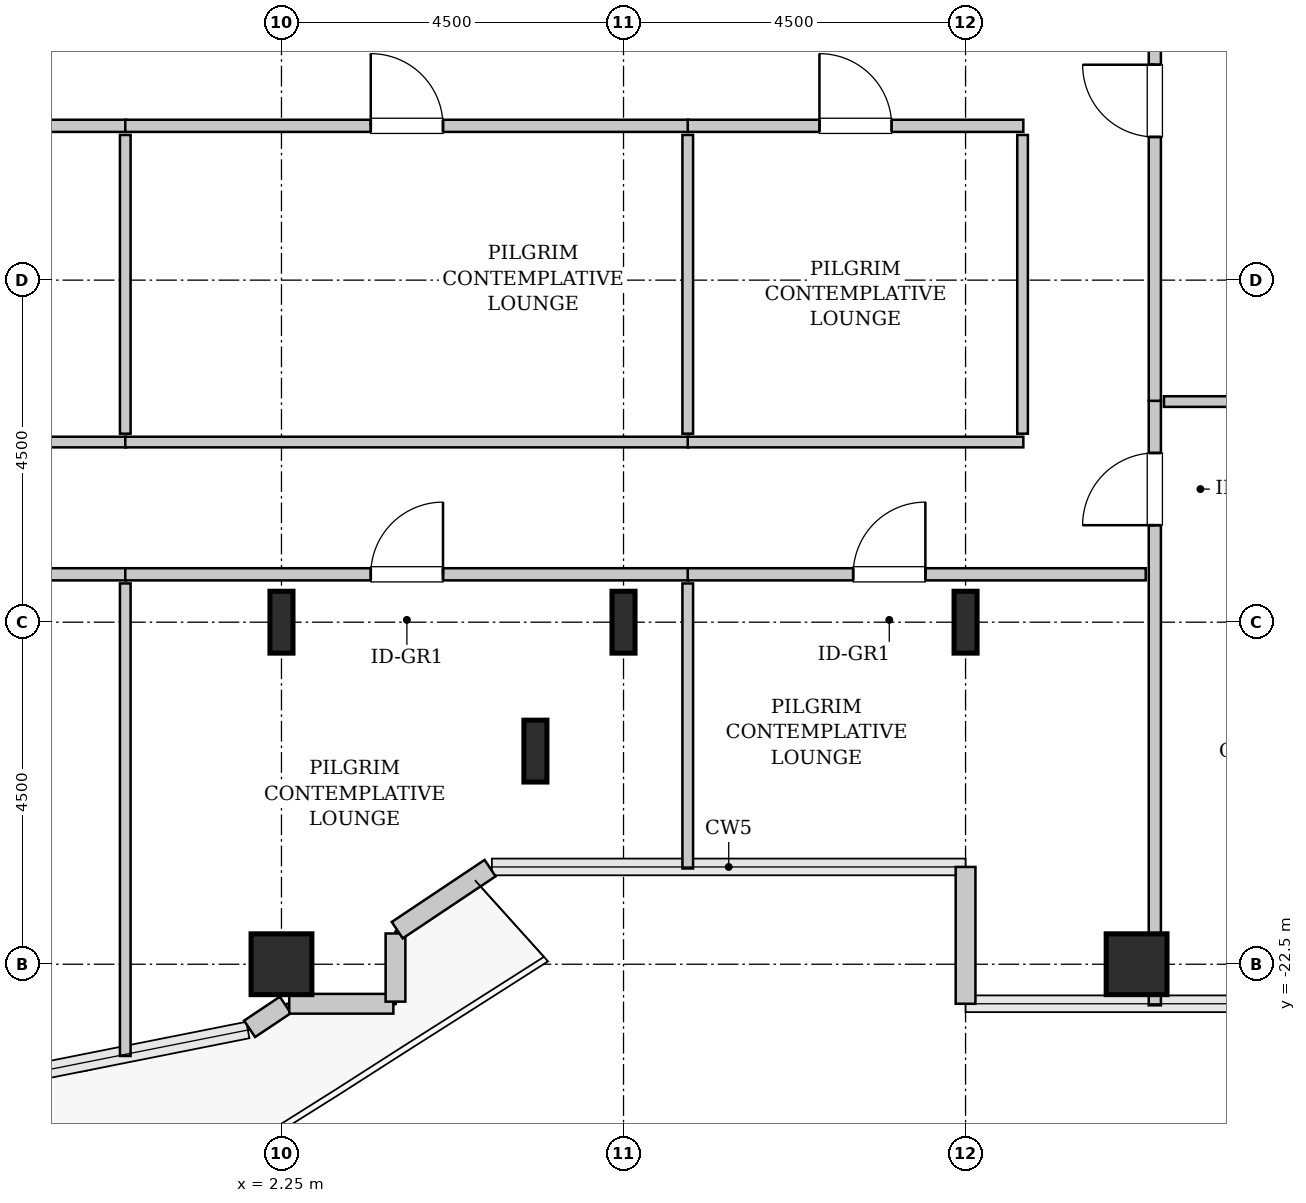
"""IFC4 building model, lengths in metres.
Left out: names, types, materials, properties, quantities, classifications, styles, units other than length and angle.
Written with IfcOpenShell. Run it as: python <this file> out.ifc"""

import sys

from ifc_helpers import new_model, si_unit, direction, frame, frame_2d, origin, origin_2d, place, context, subcontext, project, spatial, rectangle, hollow_rectangle, i_section, extrude, source, transform, mapped, element, fill, save


model = new_model("IFC4")
c1 = context("Model", 3, precision=1e-05, world=origin(), true_north=direction((0.0, 1.0)))
c2 = subcontext(c1, "Body", "Model", "MODEL_VIEW")
j1 = project(units=[si_unit("LENGTHUNIT", "METRE"), si_unit("PLANEANGLEUNIT", "RADIAN")], contexts=[c1])
p1 = place(None, origin())
s1 = spatial("IfcSite", under=j1, at=p1, CompositionType="ELEMENT")
p2 = place(p1, origin())
s2 = spatial("IfcBuilding", under=s1, at=p2, CompositionType="ELEMENT")
p3 = place(p2, frame((0.0, 0.0, 164.0)))
s3 = spatial("IfcBuildingStorey", under=s2, at=p3, CompositionType="ELEMENT", Elevation=164.0)
m1 = source(origin(), c2, "Body", "SweptSolid", [
    extrude(hollow_rectangle(XDim=0.8, YDim=0.8, WallThickness=0.04, InnerFilletRadius=0.04, OuterFilletRadius=0.08, at=origin_2d()), origin(), (0.0, 0.0, 1.0), 3.8),
])
p4 = place(p3, frame((2.25, -22.5, 0.0), z_axis=(0.0, 0.0, 1.0), x_axis=(1.0, 0.0, 0.0)))
e1 = element("IfcColumn", 1, at=p4, inside=s3, PredefinedType="COLUMN", context=c2, shape_type="MappedRepresentation", body=[
    mapped(m1, transform((0.0, 0.0, 0.0), x_axis=(1.0, 0.0, 0.0), y_axis=(0.0, 1.0, 0.0), z_axis=(0.0, 0.0, 1.0), scale=1.0)),
])
m2 = source(origin(), c2, "Body", "SweptSolid", [
    extrude(i_section(OverallWidth=0.303, OverallDepth=0.814, WebThickness=0.021, FlangeThickness=0.04, FilletRadius=0.03, at=origin_2d()), origin(), (0.0, 0.0, 1.0), 3.8),
])
for number, where, z_axis, x_axis in (
    (2, (2.25, -18.0, 0.0), (0.0, 0.0, 1.0), (1.0, 0.0, 0.0)),
    (3, (5.591, -19.696, 0.0), (0.0, 0.0, 1.0), (1.0, 0.0, 0.0)),
    (4, (6.75, -18.0, 0.0), (0.0, 0.0, 1.0), (1.0, 0.0, 0.0)),
    (5, (11.25, -18.0, 0.0), (0.0, 0.0, 1.0), (1.0, 0.0, 0.0)),
):
    element("IfcColumn", number, at=place(p3, frame(where, z_axis=z_axis, x_axis=x_axis)), inside=s3, PredefinedType="COLUMN", context=c2, shape_type="MappedRepresentation", body=[
        mapped(m2, transform((0.0, 0.0, 0.0), x_axis=(1.0, 0.0, 0.0), y_axis=(0.0, 1.0, 0.0), z_axis=(0.0, 0.0, 1.0), scale=1.0)),
    ])
p5 = place(p3, frame((13.5, -22.5, 0.0), z_axis=(0.0, 0.0, 1.0), x_axis=(1.0, 0.0, 0.0)))
e6 = element("IfcColumn", 6, at=p5, inside=s3, PredefinedType="COLUMN", context=c2, shape_type="MappedRepresentation", body=[
    mapped(m1, transform((0.0, 0.0, 0.0), x_axis=(1.0, 0.0, 0.0), y_axis=(0.0, 1.0, 0.0), z_axis=(0.0, 0.0, 1.0), scale=1.0)),
])
m3 = source(origin(), c2, "Body", "SweptSolid", [
    extrude(rectangle(XDim=1.8, YDim=0.26, at=frame_2d((0.9, 0.0))), origin(), (0.0, 0.0, 1.0), 3.55),
])
p6 = place(p3, frame((11.25, -21.22, 0.0), z_axis=(0.0, 0.0, 1.0), x_axis=(0.0, -1.0, 0.0)))
e7 = element("IfcWall", 7, at=p6, inside=s3, PredefinedType="SOLIDWALL", context=c2, shape_type="MappedRepresentation", body=[
    mapped(m3, transform((0.0, 0.0, 0.0), x_axis=(1.0, 0.0, 0.0), y_axis=(0.0, 1.0, 0.0), z_axis=(0.0, 0.0, 1.0), scale=1.0)),
])
m4 = source(origin(), c2, "Body", "SweptSolid", [
    extrude(rectangle(XDim=0.565, YDim=0.26, at=frame_2d((0.283, 0.0))), origin(), (0.0, 0.0, 1.0), 3.55),
])
p7 = place(p3, frame((1.831, -23.35, 0.0), z_axis=(0.0, 0.0, 1.0), x_axis=(0.831651492666, 0.555297933317, 0.0)))
e8 = element("IfcWall", 8, at=p7, inside=s3, PredefinedType="SOLIDWALL", context=c2, shape_type="MappedRepresentation", body=[
    mapped(m4, transform((0.0, 0.0, 0.0), x_axis=(1.0, 0.0, 0.0), y_axis=(0.0, 1.0, 0.0), z_axis=(0.0, 0.0, 1.0), scale=1.0)),
])
m5 = source(origin(), c2, "Body", "SweptSolid", [
    extrude(rectangle(XDim=1.37, YDim=0.26, at=frame_2d((0.685, 0.0))), origin(), (0.0, 0.0, 1.0), 3.55),
])
p8 = place(p3, frame((2.352, -23.02, 0.0), z_axis=(0.0, 0.0, 1.0), x_axis=(1.0, 0.0, 0.0)))
e9 = element("IfcWall", 9, at=p8, inside=s3, PredefinedType="SOLIDWALL", context=c2, shape_type="MappedRepresentation", body=[
    mapped(m5, transform((0.0, 0.0, 0.0), x_axis=(1.0, 0.0, 0.0), y_axis=(0.0, 1.0, 0.0), z_axis=(0.0, 0.0, 1.0), scale=1.0)),
])
m6 = source(origin(), c2, "Body", "SweptSolid", [
    extrude(rectangle(XDim=0.897, YDim=0.26, at=frame_2d((0.448, 0.0))), origin(), (0.0, 0.0, 1.0), 3.55),
])
p9 = place(p3, frame((3.75, -22.992, 0.0), z_axis=(0.0, 0.0, 1.0), x_axis=(0.0, 1.0, 0.0)))
e10 = element("IfcWall", 10, at=p9, inside=s3, PredefinedType="SOLIDWALL", context=c2, shape_type="MappedRepresentation", body=[
    mapped(m6, transform((0.0, 0.0, 0.0), x_axis=(1.0, 0.0, 0.0), y_axis=(0.0, 1.0, 0.0), z_axis=(0.0, 0.0, 1.0), scale=1.0)),
])
m7 = source(origin(), c2, "Body", "SweptSolid", [
    extrude(rectangle(XDim=1.469, YDim=0.26, at=frame_2d((0.734, 0.0))), origin(), (0.0, 0.0, 1.0), 3.55),
])
p10 = place(p3, frame((3.773, -22.052, 0.0), z_axis=(0.0, 0.0, 1.0), x_axis=(0.831461760506, 0.555581983884, 0.0)))
e11 = element("IfcWall", 11, at=p10, inside=s3, PredefinedType="SOLIDWALL", context=c2, shape_type="MappedRepresentation", body=[
    mapped(m7, transform((0.0, 0.0, 0.0), x_axis=(1.0, 0.0, 0.0), y_axis=(0.0, 1.0, 0.0), z_axis=(0.0, 0.0, 1.0), scale=1.0)),
])
m8 = source(origin(), c2, "Body", "SweptSolid", [
    extrude(rectangle(XDim=7.953, YDim=0.16, at=frame_2d((3.976, 0.0))), origin(), (0.0, 0.0, 1.0), 3.535),
])
p11 = place(p3, frame((13.74, -23.04, 0.0), z_axis=(0.0, 0.0, 1.0), x_axis=(0.0, 1.0, 0.0)))
e12 = element("IfcWall", 12, at=p11, inside=s3, PredefinedType="PARTITIONING", context=c2, shape_type="MappedRepresentation", body=[
    mapped(m8, transform((0.0, 0.0, 0.0), x_axis=(1.0, 0.0, 0.0), y_axis=(0.0, 1.0, 0.0), z_axis=(0.0, 0.0, 1.0), scale=1.0)),
])
p12 = place(p11, frame((6.316, 0.0, 0.0)))
e13 = element("IfcOpeningElement", 13, at=p12, cuts=e12, PredefinedType="OPENING", context=c2, shape_type="SweptSolid", body=[
    extrude(rectangle(XDim=0.95, YDim=2.1, at=frame_2d((0.475, 1.05))), frame((0.0, 0.09, 0.0), z_axis=(0.0, -1.0, 0.0), x_axis=(1.0, 0.0, 0.0)), (0.0, 0.0, 1.0), 0.18),
])
m9 = source(origin(), c2, "Body", "SweptSolid", [
    extrude(rectangle(XDim=11.43, YDim=0.14, at=frame_2d((5.715, 0.0))), origin(), (0.0, 0.0, 1.0), 3.535),
])
p13 = place(p3, frame((13.86, -15.097, 0.0), z_axis=(0.0, 0.0, 1.0), x_axis=(1.0, 0.0, 0.0)))
e14 = element("IfcWall", 14, at=p13, inside=s3, PredefinedType="PARTITIONING", context=c2, shape_type="MappedRepresentation", body=[
    mapped(m9, transform((0.0, 0.0, 0.0), x_axis=(1.0, 0.0, 0.0), y_axis=(0.0, 1.0, 0.0), z_axis=(0.0, 0.0, 1.0), scale=1.0)),
])
m10 = source(origin(), c2, "Body", "SweptSolid", [
    extrude(rectangle(XDim=7.892, YDim=0.16, at=frame_2d((3.946, 0.0))), origin(), (0.0, 0.0, 1.0), 3.535),
])
p14 = place(p3, frame((13.74, -15.087, 0.0), z_axis=(0.0, 0.0, 1.0), x_axis=(0.0, 1.0, 0.0)))
e15 = element("IfcWall", 15, at=p14, inside=s3, PredefinedType="PARTITIONING", context=c2, shape_type="MappedRepresentation", body=[
    mapped(m10, transform((0.0, 0.0, 0.0), x_axis=(1.0, 0.0, 0.0), y_axis=(0.0, 1.0, 0.0), z_axis=(0.0, 0.0, 1.0), scale=1.0)),
])
p15 = place(p14, frame((3.471, 0.0, 0.0)))
e16 = element("IfcOpeningElement", 16, at=p15, cuts=e15, PredefinedType="OPENING", context=c2, shape_type="SweptSolid", body=[
    extrude(rectangle(XDim=0.95, YDim=2.1, at=frame_2d((0.475, 1.05))), frame((0.0, 0.09, 0.0), z_axis=(0.0, -1.0, 0.0), x_axis=(1.0, 0.0, 0.0)), (0.0, 0.0, 1.0), 0.18),
])
m11 = source(origin(), c2, "Body", "SweptSolid", [
    extrude(rectangle(XDim=8.81, YDim=0.16, at=frame_2d((4.405, 0.0))), origin(), (0.0, 0.0, 1.0), 3.535),
])
p16 = place(p3, frame((-8.605, -17.37, 0.0), z_axis=(0.0, 0.0, 1.0), x_axis=(1.0, 0.0, 0.0)))
e17 = element("IfcWall", 17, at=p16, inside=s3, PredefinedType="PARTITIONING", context=c2, shape_type="MappedRepresentation", body=[
    mapped(m11, transform((0.0, 0.0, 0.0), x_axis=(1.0, 0.0, 0.0), y_axis=(0.0, 1.0, 0.0), z_axis=(0.0, 0.0, 1.0), scale=1.0)),
])
p17 = place(p16, frame((3.93, 0.0, 0.0)))
e18 = element("IfcOpeningElement", 18, at=p17, cuts=e17, PredefinedType="OPENING", context=c2, shape_type="SweptSolid", body=[
    extrude(rectangle(XDim=0.95, YDim=2.1, at=frame_2d((0.475, 1.05))), frame((0.0, 0.09, 0.0), z_axis=(0.0, -1.0, 0.0), x_axis=(1.0, 0.0, 0.0)), (0.0, 0.0, 1.0), 0.18),
])
m12 = source(origin(), c2, "Body", "SweptSolid", [
    extrude(rectangle(XDim=6.216, YDim=0.14, at=frame_2d((3.108, 0.0))), origin(), (0.0, 0.0, 1.0), 3.535),
])
p18 = place(p3, frame((0.195, -23.706, 0.0), z_axis=(0.0, 0.0, 1.0), x_axis=(0.0, 1.0, 0.0)))
e19 = element("IfcWall", 19, at=p18, inside=s3, PredefinedType="PARTITIONING", context=c2, shape_type="MappedRepresentation", body=[
    mapped(m12, transform((0.0, 0.0, 0.0), x_axis=(1.0, 0.0, 0.0), y_axis=(0.0, 1.0, 0.0), z_axis=(0.0, 0.0, 1.0), scale=1.0)),
])
m13 = source(origin(), c2, "Body", "SweptSolid", [
    extrude(rectangle(XDim=8.7, YDim=0.16, at=frame_2d((4.35, 0.0))), origin(), (0.0, 0.0, 1.0), 3.535),
])
p19 = place(p3, frame((-8.495, -11.47, 0.0), z_axis=(0.0, 0.0, 1.0), x_axis=(1.0, 0.0, 0.0)))
e20 = element("IfcWall", 20, at=p19, inside=s3, PredefinedType="PARTITIONING", context=c2, shape_type="MappedRepresentation", body=[
    mapped(m13, transform((0.0, 0.0, 0.0), x_axis=(1.0, 0.0, 0.0), y_axis=(0.0, 1.0, 0.0), z_axis=(0.0, 0.0, 1.0), scale=1.0)),
])
p20 = place(p19, frame((3.875, 0.0, 0.0)))
e21 = element("IfcOpeningElement", 21, at=p20, cuts=e20, PredefinedType="OPENING", context=c2, shape_type="SweptSolid", body=[
    extrude(rectangle(XDim=0.95, YDim=2.1, at=frame_2d((0.475, 1.05))), frame((0.0, 0.09, 0.0), z_axis=(0.0, -1.0, 0.0), x_axis=(1.0, 0.0, 0.0)), (0.0, 0.0, 1.0), 0.18),
])
m14 = source(origin(), c2, "Body", "SweptSolid", [
    extrude(rectangle(XDim=8.7, YDim=0.14, at=frame_2d((4.35, 0.0))), origin(), (0.0, 0.0, 1.0), 3.535),
])
p21 = place(p3, frame((-8.495, -15.63, 0.0), z_axis=(0.0, 0.0, 1.0), x_axis=(1.0, 0.0, 0.0)))
e22 = element("IfcWall", 22, at=p21, inside=s3, PredefinedType="PARTITIONING", context=c2, shape_type="MappedRepresentation", body=[
    mapped(m14, transform((0.0, 0.0, 0.0), x_axis=(1.0, 0.0, 0.0), y_axis=(0.0, 1.0, 0.0), z_axis=(0.0, 0.0, 1.0), scale=1.0)),
])
m15 = source(origin(), c2, "Body", "SweptSolid", [
    extrude(rectangle(XDim=3.93, YDim=0.14, at=frame_2d((1.965, 0.0))), origin(), (0.0, 0.0, 1.0), 3.535),
])
p22 = place(p3, frame((0.195, -15.52, 0.0), z_axis=(0.0, 0.0, 1.0), x_axis=(0.0, 1.0, 0.0)))
e23 = element("IfcWall", 23, at=p22, inside=s3, PredefinedType="PARTITIONING", context=c2, shape_type="MappedRepresentation", body=[
    mapped(m15, transform((0.0, 0.0, 0.0), x_axis=(1.0, 0.0, 0.0), y_axis=(0.0, 1.0, 0.0), z_axis=(0.0, 0.0, 1.0), scale=1.0)),
])
m16 = source(origin(), c2, "Body", "SweptSolid", [
    extrude(rectangle(XDim=7.41, YDim=0.16, at=frame_2d((3.705, 0.0))), origin(), (0.0, 0.0, 1.0), 3.535),
])
p23 = place(p3, frame((0.195, -17.37, 0.0), z_axis=(0.0, 0.0, 1.0), x_axis=(1.0, 0.0, 0.0)))
e24 = element("IfcWall", 24, at=p23, inside=s3, PredefinedType="PARTITIONING", context=c2, shape_type="MappedRepresentation", body=[
    mapped(m16, transform((0.0, 0.0, 0.0), x_axis=(1.0, 0.0, 0.0), y_axis=(0.0, 1.0, 0.0), z_axis=(0.0, 0.0, 1.0), scale=1.0)),
])
p24 = place(p23, frame((3.23, 0.0, 0.0)))
e25 = element("IfcOpeningElement", 25, at=p24, cuts=e24, PredefinedType="OPENING", context=c2, shape_type="SweptSolid", body=[
    extrude(rectangle(XDim=0.95, YDim=2.1, at=frame_2d((0.475, 1.05))), frame((0.0, 0.09, 0.0), z_axis=(0.0, -1.0, 0.0), x_axis=(1.0, 0.0, 0.0)), (0.0, 0.0, 1.0), 0.18),
])
m17 = source(origin(), c2, "Body", "SweptSolid", [
    extrude(rectangle(XDim=3.75, YDim=0.14, at=frame_2d((1.875, 0.0))), origin(), (0.0, 0.0, 1.0), 3.535),
])
p25 = place(p3, frame((7.595, -21.24, 0.0), z_axis=(0.0, 0.0, 1.0), x_axis=(0.0, 1.0, 0.0)))
e26 = element("IfcWall", 26, at=p25, inside=s3, PredefinedType="PARTITIONING", context=c2, shape_type="MappedRepresentation", body=[
    mapped(m17, transform((0.0, 0.0, 0.0), x_axis=(1.0, 0.0, 0.0), y_axis=(0.0, 1.0, 0.0), z_axis=(0.0, 0.0, 1.0), scale=1.0)),
])
p26 = place(p3, frame((0.195, -11.47, 0.0), z_axis=(0.0, 0.0, 1.0), x_axis=(1.0, 0.0, 0.0)))
e27 = element("IfcWall", 27, at=p26, inside=s3, PredefinedType="PARTITIONING", context=c2, shape_type="MappedRepresentation", body=[
    mapped(m16, transform((0.0, 0.0, 0.0), x_axis=(1.0, 0.0, 0.0), y_axis=(0.0, 1.0, 0.0), z_axis=(0.0, 0.0, 1.0), scale=1.0)),
])
p27 = place(p26, frame((3.23, 0.0, 0.0)))
e28 = element("IfcOpeningElement", 28, at=p27, cuts=e27, PredefinedType="OPENING", context=c2, shape_type="SweptSolid", body=[
    extrude(rectangle(XDim=0.95, YDim=2.1, at=frame_2d((0.475, 1.05))), frame((0.0, 0.09, 0.0), z_axis=(0.0, -1.0, 0.0), x_axis=(1.0, 0.0, 0.0)), (0.0, 0.0, 1.0), 0.18),
])
m18 = source(origin(), c2, "Body", "SweptSolid", [
    extrude(rectangle(XDim=7.41, YDim=0.14, at=frame_2d((3.705, 0.0))), origin(), (0.0, 0.0, 1.0), 3.535),
])
p28 = place(p3, frame((0.195, -15.63, 0.0), z_axis=(0.0, 0.0, 1.0), x_axis=(1.0, 0.0, 0.0)))
e29 = element("IfcWall", 29, at=p28, inside=s3, PredefinedType="PARTITIONING", context=c2, shape_type="MappedRepresentation", body=[
    mapped(m18, transform((0.0, 0.0, 0.0), x_axis=(1.0, 0.0, 0.0), y_axis=(0.0, 1.0, 0.0), z_axis=(0.0, 0.0, 1.0), scale=1.0)),
])
p29 = place(p3, frame((7.595, -15.52, 0.0), z_axis=(0.0, 0.0, 1.0), x_axis=(0.0, 1.0, 0.0)))
e30 = element("IfcWall", 30, at=p29, inside=s3, PredefinedType="PARTITIONING", context=c2, shape_type="MappedRepresentation", body=[
    mapped(m15, transform((0.0, 0.0, 0.0), x_axis=(1.0, 0.0, 0.0), y_axis=(0.0, 1.0, 0.0), z_axis=(0.0, 0.0, 1.0), scale=1.0)),
])
m19 = source(origin(), c2, "Body", "SweptSolid", [
    extrude(rectangle(XDim=6.025, YDim=0.16, at=frame_2d((3.013, 0.0))), origin(), (0.0, 0.0, 1.0), 3.535),
])
p30 = place(p3, frame((7.595, -17.37, 0.0), z_axis=(0.0, 0.0, 1.0), x_axis=(1.0, 0.0, 0.0)))
e31 = element("IfcWall", 31, at=p30, inside=s3, PredefinedType="PARTITIONING", context=c2, shape_type="MappedRepresentation", body=[
    mapped(m19, transform((0.0, 0.0, 0.0), x_axis=(1.0, 0.0, 0.0), y_axis=(0.0, 1.0, 0.0), z_axis=(0.0, 0.0, 1.0), scale=1.0)),
])
p31 = place(p30, frame((2.176, 0.0, 0.0)))
e32 = element("IfcOpeningElement", 32, at=p31, cuts=e31, PredefinedType="OPENING", context=c2, shape_type="SweptSolid", body=[
    extrude(rectangle(XDim=0.95, YDim=2.1, at=frame_2d((0.475, 1.05))), frame((0.0, 0.09, 0.0), z_axis=(0.0, -1.0, 0.0), x_axis=(1.0, 0.0, 0.0)), (0.0, 0.0, 1.0), 0.18),
])
m20 = source(origin(), c2, "Body", "SweptSolid", [
    extrude(rectangle(XDim=4.415, YDim=0.16, at=frame_2d((2.208, 0.0))), origin(), (0.0, 0.0, 1.0), 3.535),
])
p32 = place(p3, frame((7.595, -11.47, 0.0), z_axis=(0.0, 0.0, 1.0), x_axis=(1.0, 0.0, 0.0)))
e33 = element("IfcWall", 33, at=p32, inside=s3, PredefinedType="PARTITIONING", context=c2, shape_type="MappedRepresentation", body=[
    mapped(m20, transform((0.0, 0.0, 0.0), x_axis=(1.0, 0.0, 0.0), y_axis=(0.0, 1.0, 0.0), z_axis=(0.0, 0.0, 1.0), scale=1.0)),
])
p33 = place(p32, frame((1.732, 0.0, 0.0)))
e34 = element("IfcOpeningElement", 34, at=p33, cuts=e33, PredefinedType="OPENING", context=c2, shape_type="SweptSolid", body=[
    extrude(rectangle(XDim=0.95, YDim=2.1, at=frame_2d((0.475, 1.05))), frame((0.0, 0.09, 0.0), z_axis=(0.0, -1.0, 0.0), x_axis=(1.0, 0.0, 0.0)), (0.0, 0.0, 1.0), 0.18),
])
m21 = source(origin(), c2, "Body", "SweptSolid", [
    extrude(rectangle(XDim=4.415, YDim=0.14, at=frame_2d((2.208, 0.0))), origin(), (0.0, 0.0, 1.0), 3.535),
])
p34 = place(p3, frame((7.595, -15.63, 0.0), z_axis=(0.0, 0.0, 1.0), x_axis=(1.0, 0.0, 0.0)))
e35 = element("IfcWall", 35, at=p34, inside=s3, PredefinedType="PARTITIONING", context=c2, shape_type="MappedRepresentation", body=[
    mapped(m21, transform((0.0, 0.0, 0.0), x_axis=(1.0, 0.0, 0.0), y_axis=(0.0, 1.0, 0.0), z_axis=(0.0, 0.0, 1.0), scale=1.0)),
])
p35 = place(p3, frame((12.0, -15.52, 0.0), z_axis=(0.0, 0.0, 1.0), x_axis=(0.0, 1.0, 0.0)))
e36 = element("IfcWall", 36, at=p35, inside=s3, PredefinedType="PARTITIONING", context=c2, shape_type="MappedRepresentation", body=[
    mapped(m15, transform((0.0, 0.0, 0.0), x_axis=(1.0, 0.0, 0.0), y_axis=(0.0, 1.0, 0.0), z_axis=(0.0, 0.0, 1.0), scale=1.0)),
])
m22 = source(origin(), c2, "Body", "SweptSolid", [
    extrude(rectangle(XDim=0.95, YDim=2.1, at=frame_2d((0.475, 1.05))), frame((0.0, 0.025, 0.0), z_axis=(0.0, -1.0, 0.0), x_axis=(1.0, 0.0, 0.0)), (0.0, 0.0, 1.0), 0.05),
])
p36 = place(p12, origin())
e37 = element("IfcDoor", 37, at=p36, inside=s3, OperationType="SINGLE_SWING_LEFT", PredefinedType="DOOR", context=c2, shape_type="MappedRepresentation", body=[
    mapped(m22, transform((0.0, 0.0, 0.0), x_axis=(1.0, 0.0, 0.0), y_axis=(0.0, 1.0, 0.0), z_axis=(0.0, 0.0, 1.0), scale=1.0)),
])
fill(e13, e37)
p37 = place(p15, origin())
e38 = element("IfcDoor", 38, at=p37, inside=s3, OperationType="SINGLE_SWING_RIGHT", PredefinedType="DOOR", context=c2, shape_type="MappedRepresentation", body=[
    mapped(m22, transform((0.0, 0.0, 0.0), x_axis=(1.0, 0.0, 0.0), y_axis=(0.0, 1.0, 0.0), z_axis=(0.0, 0.0, 1.0), scale=1.0)),
])
fill(e16, e38)
p38 = place(p24, origin())
e39 = element("IfcDoor", 39, at=p38, inside=s3, OperationType="SINGLE_SWING_RIGHT", PredefinedType="DOOR", context=c2, shape_type="MappedRepresentation", body=[
    mapped(m22, transform((0.0, 0.0, 0.0), x_axis=(1.0, 0.0, 0.0), y_axis=(0.0, 1.0, 0.0), z_axis=(0.0, 0.0, 1.0), scale=1.0)),
])
fill(e25, e39)
p39 = place(p27, origin())
e40 = element("IfcDoor", 40, at=p39, inside=s3, OperationType="SINGLE_SWING_LEFT", PredefinedType="DOOR", context=c2, shape_type="MappedRepresentation", body=[
    mapped(m22, transform((0.0, 0.0, 0.0), x_axis=(1.0, 0.0, 0.0), y_axis=(0.0, 1.0, 0.0), z_axis=(0.0, 0.0, 1.0), scale=1.0)),
])
fill(e28, e40)
p40 = place(p31, origin())
e41 = element("IfcDoor", 41, at=p40, inside=s3, OperationType="SINGLE_SWING_RIGHT", PredefinedType="DOOR", context=c2, shape_type="MappedRepresentation", body=[
    mapped(m22, transform((0.0, 0.0, 0.0), x_axis=(1.0, 0.0, 0.0), y_axis=(0.0, 1.0, 0.0), z_axis=(0.0, 0.0, 1.0), scale=1.0)),
])
fill(e32, e41)
p41 = place(p33, origin())
e42 = element("IfcDoor", 42, at=p41, inside=s3, OperationType="SINGLE_SWING_LEFT", PredefinedType="DOOR", context=c2, shape_type="MappedRepresentation", body=[
    mapped(m22, transform((0.0, 0.0, 0.0), x_axis=(1.0, 0.0, 0.0), y_axis=(0.0, 1.0, 0.0), z_axis=(0.0, 0.0, 1.0), scale=1.0)),
])
fill(e34, e42)
save(model, sys.argv[1])
